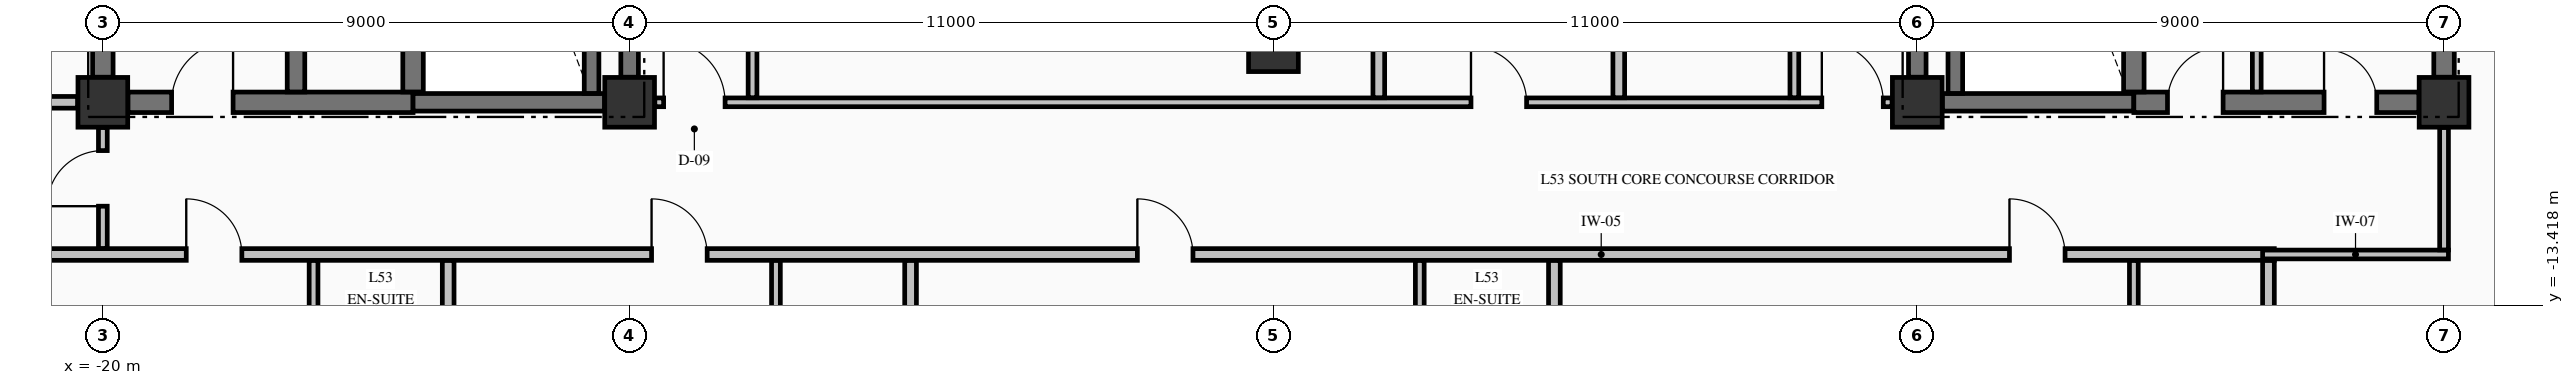
"""IFC4 building model, lengths in metres.
Left out: names, types, materials, properties, quantities, classifications, styles, units other than length and angle.
Written with IfcOpenShell. Run it as: python <this file> out.ifc"""

import sys

from ifc_helpers import new_model, si_unit, direction, frame, frame_2d, origin, origin_2d, place, context, subcontext, project, spatial, rectangle, extrude, element, fill, save


model = new_model("IFC4")
c1 = context("Model", 3, precision=1e-05, world=origin(), true_north=direction((0.0, 1.0)))
c2 = subcontext(c1, "Body", "Model", "MODEL_VIEW")
j1 = project(units=[si_unit("LENGTHUNIT", "METRE"), si_unit("PLANEANGLEUNIT", "RADIAN")], contexts=[c1])
p1 = place(None, origin())
s1 = spatial("IfcSite", under=j1, at=p1, CompositionType="ELEMENT")
p2 = place(p1, origin())
s2 = spatial("IfcBuilding", under=s1, at=p2, CompositionType="ELEMENT")
p3 = place(p2, frame((0.0, 0.0, 205.06)))
s3 = spatial("IfcBuildingStorey", under=s2, at=p3, CompositionType="ELEMENT", Elevation=205.06)
for number, where, z_axis, x_axis in (
    (1, (-20.0, -9.95, -0.25), (0.0, 0.0, 1.0), (1.0, 0.0, 0.0)),
    (2, (-11.0, -9.95, -0.25), (0.0, 0.0, 1.0), (1.0, 0.0, 0.0)),
    (3, (11.0, -9.95, -0.25), (0.0, 0.0, 1.0), (1.0, 0.0, 0.0)),
    (4, (20.0, -9.95, -0.25), (0.0, 0.0, 1.0), (1.0, 0.0, 0.0)),
    (5, (0.0, -9.0, -0.25), (0.0, 0.0, 1.0), (1.0, 0.0, 0.0)),
):
    element("IfcColumn", number, at=place(p3, frame(where, z_axis=z_axis, x_axis=x_axis)), inside=s3, PredefinedType="COLUMN", context=c2, shape_type="SweptSolid", body=[
        extrude(rectangle(XDim=0.85, YDim=0.85, at=origin_2d()), origin(), (0.0, 0.0, 1.0), 3.4),
    ])
p4 = place(p3, frame((-19.571, -9.95, 0.0), z_axis=(0.0, 0.0, 1.0), x_axis=(1.0, 0.0, 0.0)))
e6 = element("IfcWall", 6, at=p4, inside=s3, PredefinedType="SHEAR", context=c2, shape_type="SweptSolid", body=[
    extrude(rectangle(XDim=4.871, YDim=0.35, at=frame_2d((2.436, 0.0))), origin(), (0.0, 0.0, 1.0), 3.15),
])
p5 = place(p4, frame((0.746, 0.0, 0.0)))
e7 = element("IfcOpeningElement", 7, at=p5, cuts=e6, PredefinedType="OPENING", context=c2, shape_type="SweptSolid", body=[
    extrude(rectangle(XDim=1.05, YDim=2.15, at=frame_2d((0.525, 1.075))), frame((0.0, 0.185, 0.0), z_axis=(0.0, -1.0, 0.0), x_axis=(1.0, 0.0, 0.0)), (0.0, 0.0, 1.0), 0.37),
])
for number, where, z_axis, x_axis in (
    (8, (-14.7, -9.95, 0.0), (0.0, 0.0, 1.0), (1.0, 0.0, 0.0)),
    (9, (11.429, -9.95, 0.0), (0.0, 0.0, 1.0), (1.0, 0.0, 0.0)),
):
    element("IfcWall", number, at=place(p3, frame(where, z_axis=z_axis, x_axis=x_axis)), inside=s3, PredefinedType="SHEAR", context=c2, shape_type="SweptSolid", body=[
        extrude(rectangle(XDim=3.271, YDim=0.3, at=frame_2d((1.635, 0.0))), origin(), (0.0, 0.0, 1.0), 3.15),
    ])
p6 = place(p3, frame((14.7, -9.95, 0.0), z_axis=(0.0, 0.0, 1.0), x_axis=(1.0, 0.0, 0.0)))
e10 = element("IfcWall", 10, at=p6, inside=s3, PredefinedType="SHEAR", context=c2, shape_type="SweptSolid", body=[
    extrude(rectangle(XDim=4.871, YDim=0.35, at=frame_2d((2.436, 0.0))), origin(), (0.0, 0.0, 1.0), 3.15),
])
p7 = place(p6, frame((3.25, 0.0, 0.0)))
e11 = element("IfcOpeningElement", 11, at=p7, cuts=e10, PredefinedType="OPENING", context=c2, shape_type="SweptSolid", body=[
    extrude(rectangle(XDim=0.9, YDim=2.15, at=frame_2d((0.45, 1.075))), frame((0.0, 0.185, 0.0), z_axis=(0.0, -1.0, 0.0), x_axis=(1.0, 0.0, 0.0)), (0.0, 0.0, 1.0), 0.37),
])
p8 = place(p6, frame((0.575, 0.0, 0.0)))
e12 = element("IfcOpeningElement", 12, at=p8, cuts=e10, PredefinedType="OPENING", context=c2, shape_type="SweptSolid", body=[
    extrude(rectangle(XDim=0.95, YDim=2.15, at=frame_2d((0.475, 1.075))), frame((0.0, 0.185, 0.0), z_axis=(0.0, -1.0, 0.0), x_axis=(1.0, 0.0, 0.0)), (0.0, 0.0, 1.0), 0.37),
])
p9 = place(p3, frame((-22.1, -12.55, 0.0), z_axis=(0.0, 0.0, 1.0), x_axis=(1.0, 0.0, 0.0)))
e13 = element("IfcWall", 13, at=p9, inside=s3, PredefinedType="PARTITIONING", context=c2, shape_type="SweptSolid", body=[
    extrude(rectangle(XDim=39.2, YDim=0.2, at=frame_2d((19.6, 0.0))), origin(), (0.0, 0.0, 1.0), 3.15),
])
p10 = place(p9, frame((3.525, 0.0, 0.0)))
e14 = element("IfcOpeningElement", 14, at=p10, cuts=e13, PredefinedType="OPENING", context=c2, shape_type="SweptSolid", body=[
    extrude(rectangle(XDim=0.95, YDim=2.15, at=frame_2d((0.475, 1.075))), frame((0.0, 0.11, 0.0), z_axis=(0.0, -1.0, 0.0), x_axis=(1.0, 0.0, 0.0)), (0.0, 0.0, 1.0), 0.22),
])
p11 = place(p9, frame((11.475, 0.0, 0.0)))
e15 = element("IfcOpeningElement", 15, at=p11, cuts=e13, PredefinedType="OPENING", context=c2, shape_type="SweptSolid", body=[
    extrude(rectangle(XDim=0.95, YDim=2.15, at=frame_2d((0.475, 1.075))), frame((0.0, 0.11, 0.0), z_axis=(0.0, -1.0, 0.0), x_axis=(1.0, 0.0, 0.0)), (0.0, 0.0, 1.0), 0.22),
])
p12 = place(p9, frame((19.775, 0.0, 0.0)))
e16 = element("IfcOpeningElement", 16, at=p12, cuts=e13, PredefinedType="OPENING", context=c2, shape_type="SweptSolid", body=[
    extrude(rectangle(XDim=0.95, YDim=2.15, at=frame_2d((0.475, 1.075))), frame((0.0, 0.11, 0.0), z_axis=(0.0, -1.0, 0.0), x_axis=(1.0, 0.0, 0.0)), (0.0, 0.0, 1.0), 0.22),
])
p13 = place(p9, frame((34.675, 0.0, 0.0)))
e17 = element("IfcOpeningElement", 17, at=p13, cuts=e13, PredefinedType="OPENING", context=c2, shape_type="SweptSolid", body=[
    extrude(rectangle(XDim=0.95, YDim=2.15, at=frame_2d((0.475, 1.075))), frame((0.0, 0.11, 0.0), z_axis=(0.0, -1.0, 0.0), x_axis=(1.0, 0.0, 0.0)), (0.0, 0.0, 1.0), 0.22),
])
p14 = place(p3, frame((16.9, -12.55, 0.0), z_axis=(0.0, 0.0, 1.0), x_axis=(1.0, 0.0, 0.0)))
e18 = element("IfcWall", 18, at=p14, inside=s3, PredefinedType="PARTITIONING", context=c2, shape_type="SweptSolid", body=[
    extrude(rectangle(XDim=3.175, YDim=0.15, at=frame_2d((1.587, 0.0))), origin(), (0.0, 0.0, 1.0), 3.15),
])
p15 = place(p3, frame((-26.835, -9.95, 0.0), z_axis=(0.0, 0.0, 1.0), x_axis=(1.0, 0.0, 0.0)))
e19 = element("IfcWall", 19, at=p15, inside=s3, PredefinedType="PARTITIONING", context=c2, shape_type="SweptSolid", body=[
    extrude(rectangle(XDim=6.404, YDim=0.2, at=frame_2d((3.202, 0.0))), origin(), (0.0, 0.0, 1.0), 3.15),
])
p16 = place(p15, frame((2.86, 0.0, 0.0)))
e20 = element("IfcOpeningElement", 20, at=p16, cuts=e19, PredefinedType="OPENING", context=c2, shape_type="SweptSolid", body=[
    extrude(rectangle(XDim=0.95, YDim=2.15, at=frame_2d((0.475, 1.075))), frame((0.0, 0.11, 0.0), z_axis=(0.0, -1.0, 0.0), x_axis=(1.0, 0.0, 0.0)), (0.0, 0.0, 1.0), 0.22),
])
p17 = place(p3, frame((-10.569, -9.95, 0.0), z_axis=(0.0, 0.0, 1.0), x_axis=(1.0, 0.0, 0.0)))
e21 = element("IfcWall", 21, at=p17, inside=s3, PredefinedType="PARTITIONING", context=c2, shape_type="SweptSolid", body=[
    extrude(rectangle(XDim=21.138, YDim=0.15, at=frame_2d((10.569, 0.0))), origin(), (0.0, 0.0, 1.0), 3.15),
])
p18 = place(p17, frame((0.15, 0.0, 0.0)))
e22 = element("IfcOpeningElement", 22, at=p18, cuts=e21, PredefinedType="OPENING", context=c2, shape_type="SweptSolid", body=[
    extrude(rectangle(XDim=1.05, YDim=2.15, at=frame_2d((0.525, 1.075))), frame((0.0, 0.085, 0.0), z_axis=(0.0, -1.0, 0.0), x_axis=(1.0, 0.0, 0.0)), (0.0, 0.0, 1.0), 0.17),
])
p19 = place(p17, frame((19.938, 0.0, 0.0)))
e23 = element("IfcOpeningElement", 23, at=p19, cuts=e21, PredefinedType="OPENING", context=c2, shape_type="SweptSolid", body=[
    extrude(rectangle(XDim=1.05, YDim=2.15, at=frame_2d((0.525, 1.075))), frame((0.0, 0.085, 0.0), z_axis=(0.0, -1.0, 0.0), x_axis=(1.0, 0.0, 0.0)), (0.0, 0.0, 1.0), 0.17),
])
p20 = place(p17, frame((13.944, 0.0, 0.0)))
e24 = element("IfcOpeningElement", 24, at=p20, cuts=e21, PredefinedType="OPENING", context=c2, shape_type="SweptSolid", body=[
    extrude(rectangle(XDim=0.95, YDim=2.15, at=frame_2d((0.475, 1.075))), frame((0.0, 0.085, 0.0), z_axis=(0.0, -1.0, 0.0), x_axis=(1.0, 0.0, 0.0)), (0.0, 0.0, 1.0), 0.17),
])
p21 = place(p3, frame((-20.0, -9.521, 0.0), z_axis=(0.0, 0.0, 1.0), x_axis=(0.0, 1.0, 0.0)))
e25 = element("IfcWall", 25, at=p21, inside=s3, PredefinedType="SHEAR", context=c2, shape_type="SweptSolid", body=[
    extrude(rectangle(XDim=9.092, YDim=0.35, at=frame_2d((4.546, 0.0))), origin(), (0.0, 0.0, 1.0), 3.15),
])
p22 = place(p3, frame((-16.7, -9.773, 0.0), z_axis=(0.0, 0.0, 1.0), x_axis=(0.0, 1.0, 0.0)))
e26 = element("IfcWall", 26, at=p22, inside=s3, PredefinedType="SHEAR", context=c2, shape_type="SweptSolid", body=[
    extrude(rectangle(XDim=9.371, YDim=0.3, at=frame_2d((4.686, 0.0))), origin(), (0.0, 0.0, 1.0), 3.15),
])
p23 = place(p3, frame((-14.7, -9.773, 0.0), z_axis=(0.0, 0.0, 1.0), x_axis=(0.0, 1.0, 0.0)))
e27 = element("IfcWall", 27, at=p23, inside=s3, PredefinedType="SHEAR", context=c2, shape_type="SweptSolid", body=[
    extrude(rectangle(XDim=9.371, YDim=0.35, at=frame_2d((4.686, 0.0))), origin(), (0.0, 0.0, 1.0), 3.15),
])
p24 = place(p3, frame((-11.65, -9.798, 0.0), z_axis=(0.0, 0.0, 1.0), x_axis=(0.0, 1.0, 0.0)))
e28 = element("IfcWall", 28, at=p24, inside=s3, PredefinedType="SOLIDWALL", context=c2, shape_type="SweptSolid", body=[
    extrude(rectangle(XDim=9.396, YDim=0.25, at=frame_2d((4.698, 0.0))), origin(), (0.0, 0.0, 1.0), 3.15),
])
for number, where, z_axis, x_axis in (
    (29, (-11.0, -9.521, 0.0), (0.0, 0.0, 1.0), (0.0, 1.0, 0.0)),
    (30, (11.0, -9.521, 0.0), (0.0, 0.0, 1.0), (0.0, 1.0, 0.0)),
):
    element("IfcWall", number, at=place(p3, frame(where, z_axis=z_axis, x_axis=x_axis)), inside=s3, PredefinedType="SHEAR", context=c2, shape_type="SweptSolid", body=[
        extrude(rectangle(XDim=9.092, YDim=0.3, at=frame_2d((4.546, 0.0))), origin(), (0.0, 0.0, 1.0), 3.15),
    ])
p25 = place(p3, frame((11.65, -9.798, 0.0), z_axis=(0.0, 0.0, 1.0), x_axis=(0.0, 1.0, 0.0)))
e31 = element("IfcWall", 31, at=p25, inside=s3, PredefinedType="SOLIDWALL", context=c2, shape_type="SweptSolid", body=[
    extrude(rectangle(XDim=9.396, YDim=0.25, at=frame_2d((4.698, 0.0))), origin(), (0.0, 0.0, 1.0), 3.15),
])
p26 = place(p3, frame((14.7, -9.773, 0.0), z_axis=(0.0, 0.0, 1.0), x_axis=(0.0, 1.0, 0.0)))
e32 = element("IfcWall", 32, at=p26, inside=s3, PredefinedType="SHEAR", context=c2, shape_type="SweptSolid", body=[
    extrude(rectangle(XDim=9.371, YDim=0.35, at=frame_2d((4.686, 0.0))), origin(), (0.0, 0.0, 1.0), 3.15),
])
p27 = place(p3, frame((20.0, -9.521, 0.0), z_axis=(0.0, 0.0, 1.0), x_axis=(0.0, 1.0, 0.0)))
e33 = element("IfcWall", 33, at=p27, inside=s3, PredefinedType="SHEAR", context=c2, shape_type="SweptSolid", body=[
    extrude(rectangle(XDim=9.092, YDim=0.35, at=frame_2d((4.546, 0.0))), origin(), (0.0, 0.0, 1.0), 3.15),
])
p28 = place(p3, frame((-20.0, -12.447, 0.0), z_axis=(0.0, 0.0, 1.0), x_axis=(0.0, 1.0, 0.0)))
e34 = element("IfcWall", 34, at=p28, inside=s3, PredefinedType="PARTITIONING", context=c2, shape_type="SweptSolid", body=[
    extrude(rectangle(XDim=2.066, YDim=0.15, at=frame_2d((1.033, 0.0))), origin(), (0.0, 0.0, 1.0), 2.342),
])
p29 = place(p28, frame((0.722, 0.0, 0.0)))
e35 = element("IfcOpeningElement", 35, at=p29, cuts=e34, PredefinedType="OPENING", context=c2, shape_type="SweptSolid", body=[
    extrude(rectangle(XDim=0.95, YDim=2.15, at=frame_2d((0.475, 1.075))), frame((0.0, 0.085, 0.0), z_axis=(0.0, -1.0, 0.0), x_axis=(1.0, 0.0, 0.0)), (0.0, 0.0, 1.0), 0.17),
])
p30 = place(p3, frame((-16.4, -15.422, 0.0), z_axis=(0.0, 0.0, 1.0), x_axis=(0.0, 1.0, 0.0)))
e36 = element("IfcWall", 36, at=p30, inside=s3, PredefinedType="PARTITIONING", context=c2, shape_type="SweptSolid", body=[
    extrude(rectangle(XDim=2.769, YDim=0.15, at=frame_2d((1.385, 0.0))), origin(), (0.0, 0.0, 1.0), 3.15),
])
p31 = place(p3, frame((-14.1, -15.422, 0.0), z_axis=(0.0, 0.0, 1.0), x_axis=(0.0, 1.0, 0.0)))
e37 = element("IfcWall", 37, at=p31, inside=s3, PredefinedType="PARTITIONING", context=c2, shape_type="SweptSolid", body=[
    extrude(rectangle(XDim=2.769, YDim=0.2, at=frame_2d((1.385, 0.0))), origin(), (0.0, 0.0, 1.0), 3.15),
])
p32 = place(p3, frame((-8.9, -9.872, 0.0), z_axis=(0.0, 0.0, 1.0), x_axis=(0.0, 1.0, 0.0)))
e38 = element("IfcWall", 38, at=p32, inside=s3, PredefinedType="PARTITIONING", context=c2, shape_type="SweptSolid", body=[
    extrude(rectangle(XDim=11.969, YDim=0.15, at=frame_2d((5.984, 0.0))), origin(), (0.0, 0.0, 1.0), 3.15),
])
p33 = place(p32, frame((5.502, 0.0, 0.0)))
e39 = element("IfcOpeningElement", 39, at=p33, cuts=e38, PredefinedType="OPENING", context=c2, shape_type="SweptSolid", body=[
    extrude(rectangle(XDim=1.0, YDim=2.15, at=frame_2d((0.5, 1.075))), frame((0.0, 0.085, 0.0), z_axis=(0.0, -1.0, 0.0), x_axis=(1.0, 0.0, 0.0)), (0.0, 0.0, 1.0), 0.17),
])
p34 = place(p3, frame((-8.5, -14.722, 0.0), z_axis=(0.0, 0.0, 1.0), x_axis=(0.0, 1.0, 0.0)))
e40 = element("IfcWall", 40, at=p34, inside=s3, PredefinedType="PARTITIONING", context=c2, shape_type="SweptSolid", body=[
    extrude(rectangle(XDim=2.069, YDim=0.15, at=frame_2d((1.034, 0.0))), origin(), (0.0, 0.0, 1.0), 3.15),
])
p35 = place(p3, frame((-6.2, -14.722, 0.0), z_axis=(0.0, 0.0, 1.0), x_axis=(0.0, 1.0, 0.0)))
e41 = element("IfcWall", 41, at=p35, inside=s3, PredefinedType="PARTITIONING", context=c2, shape_type="SweptSolid", body=[
    extrude(rectangle(XDim=2.069, YDim=0.2, at=frame_2d((1.034, 0.0))), origin(), (0.0, 0.0, 1.0), 3.15),
])
p36 = place(p3, frame((1.8, -9.872, 0.0), z_axis=(0.0, 0.0, 1.0), x_axis=(0.0, 1.0, 0.0)))
e42 = element("IfcWall", 42, at=p36, inside=s3, PredefinedType="PARTITIONING", context=c2, shape_type="SweptSolid", body=[
    extrude(rectangle(XDim=4.569, YDim=0.2, at=frame_2d((2.285, 0.0))), origin(), (0.0, 0.0, 1.0), 3.15),
])
p37 = place(p3, frame((2.5, -15.422, 0.0), z_axis=(0.0, 0.0, 1.0), x_axis=(0.0, 1.0, 0.0)))
e43 = element("IfcWall", 43, at=p37, inside=s3, PredefinedType="PARTITIONING", context=c2, shape_type="SweptSolid", body=[
    extrude(rectangle(XDim=2.769, YDim=0.15, at=frame_2d((1.385, 0.0))), origin(), (0.0, 0.0, 1.0), 3.15),
])
p38 = place(p3, frame((4.8, -15.422, 0.0), z_axis=(0.0, 0.0, 1.0), x_axis=(0.0, 1.0, 0.0)))
e44 = element("IfcWall", 44, at=p38, inside=s3, PredefinedType="PARTITIONING", context=c2, shape_type="SweptSolid", body=[
    extrude(rectangle(XDim=2.769, YDim=0.2, at=frame_2d((1.385, 0.0))), origin(), (0.0, 0.0, 1.0), 3.15),
])
p39 = place(p3, frame((5.9, -9.872, 0.0), z_axis=(0.0, 0.0, 1.0), x_axis=(0.0, 1.0, 0.0)))
e45 = element("IfcWall", 45, at=p39, inside=s3, PredefinedType="PARTITIONING", context=c2, shape_type="SweptSolid", body=[
    extrude(rectangle(XDim=4.569, YDim=0.2, at=frame_2d((2.285, 0.0))), origin(), (0.0, 0.0, 1.0), 3.15),
])
p40 = place(p3, frame((8.9, -9.872, 0.0), z_axis=(0.0, 0.0, 1.0), x_axis=(0.0, 1.0, 0.0)))
e46 = element("IfcWall", 46, at=p40, inside=s3, PredefinedType="PARTITIONING", context=c2, shape_type="SweptSolid", body=[
    extrude(rectangle(XDim=4.569, YDim=0.15, at=frame_2d((2.285, 0.0))), origin(), (0.0, 0.0, 1.0), 3.15),
])
p41 = place(p40, frame((1.847, 0.0, 0.0)))
e47 = element("IfcOpeningElement", 47, at=p41, cuts=e46, PredefinedType="OPENING", context=c2, shape_type="SweptSolid", body=[
    extrude(rectangle(XDim=0.95, YDim=2.15, at=frame_2d((0.475, 1.075))), frame((0.0, 0.085, 0.0), z_axis=(0.0, -1.0, 0.0), x_axis=(1.0, 0.0, 0.0)), (0.0, 0.0, 1.0), 0.17),
])
p42 = place(p3, frame((14.7, -14.722, 0.0), z_axis=(0.0, 0.0, 1.0), x_axis=(0.0, 1.0, 0.0)))
e48 = element("IfcWall", 48, at=p42, inside=s3, PredefinedType="PARTITIONING", context=c2, shape_type="SweptSolid", body=[
    extrude(rectangle(XDim=2.069, YDim=0.15, at=frame_2d((1.034, 0.0))), origin(), (0.0, 0.0, 1.0), 3.15),
])
p43 = place(p3, frame((16.8, -9.772, 0.0), z_axis=(0.0, 0.0, 1.0), x_axis=(0.0, 1.0, 0.0)))
e49 = element("IfcWall", 49, at=p43, inside=s3, PredefinedType="PARTITIONING", context=c2, shape_type="SweptSolid", body=[
    extrude(rectangle(XDim=7.194, YDim=0.15, at=frame_2d((3.597, 0.0))), origin(), (0.0, 0.0, 1.0), 3.15),
])
p44 = place(p3, frame((17.0, -14.722, 0.0), z_axis=(0.0, 0.0, 1.0), x_axis=(0.0, 1.0, 0.0)))
e50 = element("IfcWall", 50, at=p44, inside=s3, PredefinedType="PARTITIONING", context=c2, shape_type="SweptSolid", body=[
    extrude(rectangle(XDim=2.069, YDim=0.2, at=frame_2d((1.034, 0.0))), origin(), (0.0, 0.0, 1.0), 3.15),
])
p45 = place(p3, frame((20.0, -12.472, 0.0), z_axis=(0.0, 0.0, 1.0), x_axis=(0.0, 1.0, 0.0)))
e51 = element("IfcWall", 51, at=p45, inside=s3, PredefinedType="PARTITIONING", context=c2, shape_type="SweptSolid", body=[
    extrude(rectangle(XDim=2.091, YDim=0.15, at=frame_2d((1.045, 0.0))), origin(), (0.0, 0.0, 1.0), 2.342),
])
p46 = place(p5, origin())
e52 = element("IfcDoor", 52, at=p46, inside=s3, OperationType="SINGLE_SWING_RIGHT", PredefinedType="DOOR", context=c2, shape_type="SweptSolid", body=[
    extrude(rectangle(XDim=1.05, YDim=2.15, at=frame_2d((0.525, 1.075))), frame((0.0, 0.025, 0.0), z_axis=(0.0, -1.0, 0.0), x_axis=(1.0, 0.0, 0.0)), (0.0, 0.0, 1.0), 0.05),
])
fill(e7, e52)
p47 = place(p7, origin())
e53 = element("IfcDoor", 53, at=p47, inside=s3, OperationType="SINGLE_SWING_LEFT", PredefinedType="DOOR", context=c2, shape_type="SweptSolid", body=[
    extrude(rectangle(XDim=0.9, YDim=2.15, at=frame_2d((0.45, 1.075))), frame((0.0, 0.025, 0.0), z_axis=(0.0, -1.0, 0.0), x_axis=(1.0, 0.0, 0.0)), (0.0, 0.0, 1.0), 0.05),
])
fill(e11, e53)
p48 = place(p8, origin())
e54 = element("IfcDoor", 54, at=p48, inside=s3, OperationType="SINGLE_SWING_RIGHT", PredefinedType="DOOR", context=c2, shape_type="SweptSolid", body=[
    extrude(rectangle(XDim=0.95, YDim=2.15, at=frame_2d((0.475, 1.075))), frame((0.0, 0.025, 0.0), z_axis=(0.0, -1.0, 0.0), x_axis=(1.0, 0.0, 0.0)), (0.0, 0.0, 1.0), 0.05),
])
fill(e12, e54)
p49 = place(p18, origin())
e55 = element("IfcDoor", 55, at=p49, inside=s3, OperationType="SINGLE_SWING_LEFT", PredefinedType="DOOR", context=c2, shape_type="SweptSolid", body=[
    extrude(rectangle(XDim=1.05, YDim=2.15, at=frame_2d((0.525, 1.075))), frame((0.0, 0.025, 0.0), z_axis=(0.0, -1.0, 0.0), x_axis=(1.0, 0.0, 0.0)), (0.0, 0.0, 1.0), 0.05),
])
fill(e22, e55)
p50 = place(p19, origin())
e56 = element("IfcDoor", 56, at=p50, inside=s3, OperationType="SINGLE_SWING_LEFT", PredefinedType="DOOR", context=c2, shape_type="SweptSolid", body=[
    extrude(rectangle(XDim=1.05, YDim=2.15, at=frame_2d((0.525, 1.075))), frame((0.0, 0.025, 0.0), z_axis=(0.0, -1.0, 0.0), x_axis=(1.0, 0.0, 0.0)), (0.0, 0.0, 1.0), 0.05),
])
fill(e23, e56)
p51 = place(p10, origin())
e57 = element("IfcDoor", 57, at=p51, inside=s3, OperationType="SINGLE_SWING_LEFT", PredefinedType="DOOR", context=c2, shape_type="SweptSolid", body=[
    extrude(rectangle(XDim=0.95, YDim=2.15, at=frame_2d((0.475, 1.075))), frame((0.0, 0.025, 0.0), z_axis=(0.0, -1.0, 0.0), x_axis=(1.0, 0.0, 0.0)), (0.0, 0.0, 1.0), 0.05),
])
fill(e14, e57)
p52 = place(p11, origin())
e58 = element("IfcDoor", 58, at=p52, inside=s3, OperationType="SINGLE_SWING_LEFT", PredefinedType="DOOR", context=c2, shape_type="SweptSolid", body=[
    extrude(rectangle(XDim=0.95, YDim=2.15, at=frame_2d((0.475, 1.075))), frame((0.0, 0.025, 0.0), z_axis=(0.0, -1.0, 0.0), x_axis=(1.0, 0.0, 0.0)), (0.0, 0.0, 1.0), 0.05),
])
fill(e15, e58)
p53 = place(p12, origin())
e59 = element("IfcDoor", 59, at=p53, inside=s3, OperationType="SINGLE_SWING_LEFT", PredefinedType="DOOR", context=c2, shape_type="SweptSolid", body=[
    extrude(rectangle(XDim=0.95, YDim=2.15, at=frame_2d((0.475, 1.075))), frame((0.0, 0.025, 0.0), z_axis=(0.0, -1.0, 0.0), x_axis=(1.0, 0.0, 0.0)), (0.0, 0.0, 1.0), 0.05),
])
fill(e16, e59)
p54 = place(p13, origin())
e60 = element("IfcDoor", 60, at=p54, inside=s3, OperationType="SINGLE_SWING_LEFT", PredefinedType="DOOR", context=c2, shape_type="SweptSolid", body=[
    extrude(rectangle(XDim=0.95, YDim=2.15, at=frame_2d((0.475, 1.075))), frame((0.0, 0.025, 0.0), z_axis=(0.0, -1.0, 0.0), x_axis=(1.0, 0.0, 0.0)), (0.0, 0.0, 1.0), 0.05),
])
fill(e17, e60)
p55 = place(p20, origin())
e61 = element("IfcDoor", 61, at=p55, inside=s3, OperationType="SINGLE_SWING_LEFT", PredefinedType="DOOR", context=c2, shape_type="SweptSolid", body=[
    extrude(rectangle(XDim=0.95, YDim=2.15, at=frame_2d((0.475, 1.075))), frame((0.0, 0.025, 0.0), z_axis=(0.0, -1.0, 0.0), x_axis=(1.0, 0.0, 0.0)), (0.0, 0.0, 1.0), 0.05),
])
fill(e24, e61)
p56 = place(p29, origin())
e62 = element("IfcDoor", 62, at=p56, inside=s3, OperationType="SINGLE_SWING_LEFT", PredefinedType="DOOR", context=c2, shape_type="SweptSolid", body=[
    extrude(rectangle(XDim=0.95, YDim=2.15, at=frame_2d((0.475, 1.075))), frame((0.0, 0.025, 0.0), z_axis=(0.0, -1.0, 0.0), x_axis=(1.0, 0.0, 0.0)), (0.0, 0.0, 1.0), 0.05),
])
fill(e35, e62)
save(model, sys.argv[1])
